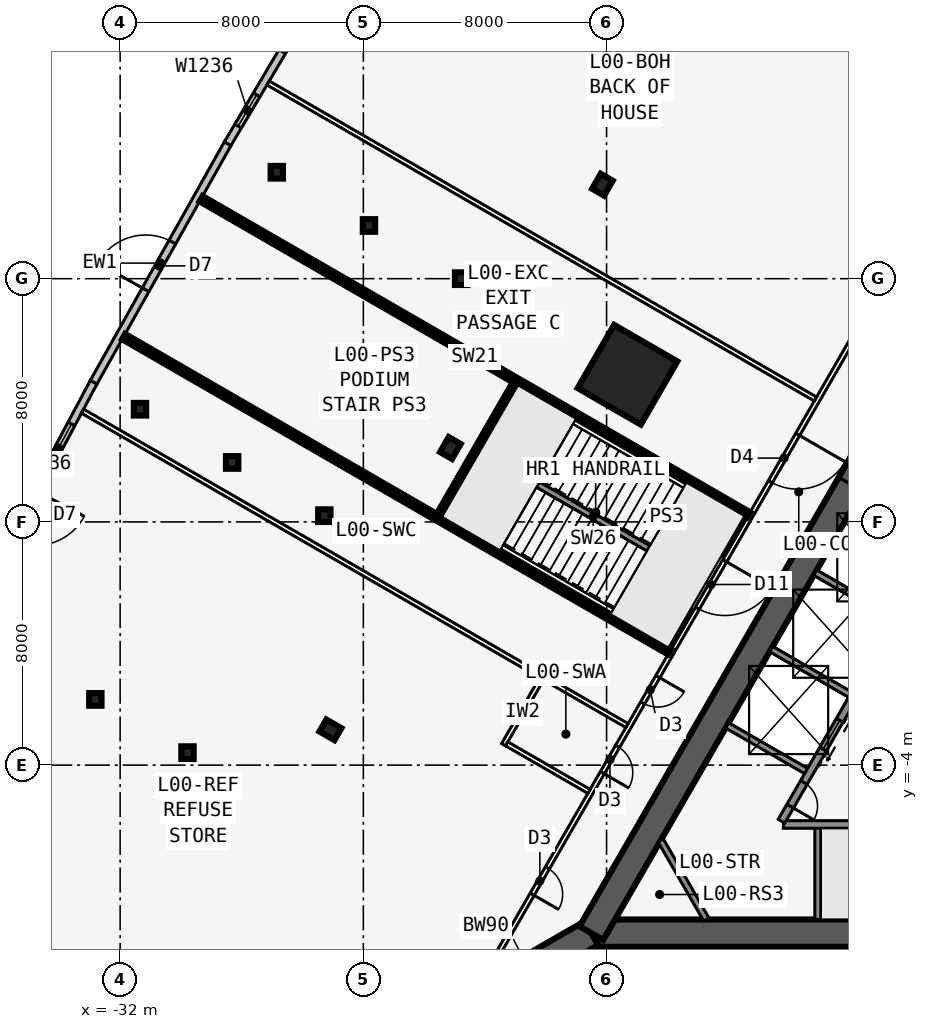
"""IFC4 building model, lengths in metres.
Left out: names, types, materials, properties, quantities, classifications, styles, units other than length and angle.
Written with IfcOpenShell. Run it as: python <this file> out.ifc"""

import sys

from ifc_helpers import new_model, si_unit, direction, frame, frame_2d, origin, origin_2d, place, context, subcontext, project, spatial, rectangle, i_section, extrude, element, fill, save


model = new_model("IFC4")
c1 = context("Model", 3, precision=1e-05, world=origin(), true_north=direction((0.0, 1.0)))
c2 = subcontext(c1, "Body", "Model", "MODEL_VIEW")
j1 = project(units=[si_unit("LENGTHUNIT", "METRE"), si_unit("PLANEANGLEUNIT", "RADIAN")], contexts=[c1])
p1 = place(None, origin())
s1 = spatial("IfcSite", under=j1, at=p1, CompositionType="ELEMENT")
p2 = place(p1, origin())
s2 = spatial("IfcBuilding", under=s1, at=p2, CompositionType="ELEMENT")
p3 = place(p2, origin())
s3 = spatial("IfcBuildingStorey", under=s2, at=p3, CompositionType="ELEMENT", Elevation=0.0)
p4 = place(p3, frame((-16.5, -9.526, -0.3), z_axis=(0.0, 0.0, 1.0), x_axis=(1.0, 0.0, 0.0)))
e1 = element("IfcWall", 1, at=p4, inside=s3, PredefinedType="SHEAR", context=c2, shape_type="SweptSolid", body=[
    extrude(rectangle(XDim=33.0, YDim=0.9, at=frame_2d((16.5, 0.0))), origin(), (0.0, 0.0, 1.0), 6.3),
])
p5 = place(p4, frame((14.05, 0.0, 0.3)))
e2 = element("IfcOpeningElement", 2, at=p5, cuts=e1, PredefinedType="OPENING", context=c2, shape_type="SweptSolid", body=[
    extrude(rectangle(XDim=1.8, YDim=2.13, at=frame_2d((0.9, 1.065))), frame((0.0, 0.46, 0.0), z_axis=(0.0, -1.0, 0.0), x_axis=(1.0, 0.0, 0.0)), (0.0, 0.0, 1.0), 0.92),
])
p6 = place(p3, frame((-10.183, -5.951, -0.3), z_axis=(0.0, 0.0, 1.0), x_axis=(1.0, 0.0, 0.0)))
e3 = element("IfcWall", 3, at=p6, inside=s3, PredefinedType="SOLIDWALL", context=c2, shape_type="SweptSolid", body=[
    extrude(rectangle(XDim=7.633, YDim=0.25, at=frame_2d((3.816, 0.0))), origin(), (0.0, 0.0, 1.0), 6.05),
])
p7 = place(p3, frame((-9.05, -5.951, -0.3), z_axis=(0.0, 0.0, 1.0), x_axis=(0.0, -1.0, 0.0)))
e4 = element("IfcWall", 4, at=p7, inside=s3, PredefinedType="SOLIDWALL", context=c2, shape_type="SweptSolid", body=[
    extrude(rectangle(XDim=3.125, YDim=0.2, at=frame_2d((1.562, 0.0))), origin(), (0.0, 0.0, 1.0), 6.05),
])
p8 = place(p3, frame((0.0, 19.052, -0.3), z_axis=(0.0, 0.0, 1.0), x_axis=(-0.499999749417, -0.866025548458, 0.0)))
e5 = element("IfcWall", 5, at=p8, inside=s3, PredefinedType="SHEAR", context=c2, shape_type="SweptSolid", body=[
    extrude(rectangle(XDim=33.0, YDim=0.9, at=frame_2d((16.5, 0.0))), origin(), (0.0, 0.0, 1.0), 6.3),
])
p9 = place(p8, frame((14.15, 0.0, 0.3)))
e6 = element("IfcOpeningElement", 6, at=p9, cuts=e5, PredefinedType="OPENING", context=c2, shape_type="SweptSolid", body=[
    extrude(rectangle(XDim=1.8, YDim=2.13, at=frame_2d((0.9, 1.065))), frame((0.0, 0.46, 0.0), z_axis=(0.0, -1.0, 0.0), x_axis=(1.0, 0.0, 0.0)), (0.0, 0.0, 1.0), 0.92),
])
p10 = place(p8, frame((12.6, 0.0, 0.3)))
e7 = element("IfcOpeningElement", 7, at=p10, cuts=e5, PredefinedType="OPENING", context=c2, shape_type="SweptSolid", body=[
    extrude(rectangle(XDim=1.0, YDim=2.13, at=frame_2d((0.5, 1.065))), frame((0.0, 0.46, 0.0), z_axis=(0.0, -1.0, 0.0), x_axis=(1.0, 0.0, 0.0)), (0.0, 0.0, 1.0), 0.92),
])
p11 = place(p3, frame((-4.929, 3.365, -0.3), z_axis=(0.0, 0.0, 1.0), x_axis=(-0.499991433582, -0.866030349552, 0.0)))
e8 = element("IfcWall", 8, at=p11, inside=s3, PredefinedType="SOLIDWALL", context=c2, shape_type="SweptSolid", body=[
    extrude(rectangle(XDim=10.633, YDim=0.25, at=frame_2d((5.316, 0.0))), origin(), (0.0, 0.0, 1.0), 6.05),
])
p12 = place(p11, frame((9.164, 0.0, 0.3)))
e9 = element("IfcOpeningElement", 9, at=p12, cuts=e8, PredefinedType="OPENING", context=c2, shape_type="SweptSolid", body=[
    extrude(rectangle(XDim=0.9, YDim=2.13, at=frame_2d((0.45, 1.065))), frame((0.0, 0.135, 0.0), z_axis=(0.0, -1.0, 0.0), x_axis=(1.0, 0.0, 0.0)), (0.0, 0.0, 1.0), 0.27),
])
p13 = place(p11, frame((6.8, 0.0, 0.3)))
e10 = element("IfcOpeningElement", 10, at=p13, cuts=e8, PredefinedType="OPENING", context=c2, shape_type="SweptSolid", body=[
    extrude(rectangle(XDim=1.1, YDim=2.13, at=frame_2d((0.55, 1.065))), frame((0.0, 0.135, 0.0), z_axis=(0.0, -1.0, 0.0), x_axis=(1.0, 0.0, 0.0)), (0.0, 0.0, 1.0), 0.27),
])
p14 = place(p11, frame((1.0, 0.0, 0.3)))
e11 = element("IfcOpeningElement", 11, at=p14, cuts=e8, PredefinedType="OPENING", context=c2, shape_type="SweptSolid", body=[
    extrude(rectangle(XDim=1.1, YDim=2.13, at=frame_2d((0.55, 1.065))), frame((0.0, 0.135, 0.0), z_axis=(0.0, -1.0, 0.0), x_axis=(1.0, 0.0, 0.0)), (0.0, 0.0, 1.0), 0.27),
])
p15 = place(p11, frame((3.9, 0.0, 0.3)))
e12 = element("IfcOpeningElement", 12, at=p15, cuts=e8, PredefinedType="OPENING", context=c2, shape_type="SweptSolid", body=[
    extrude(rectangle(XDim=1.1, YDim=2.13, at=frame_2d((0.55, 1.065))), frame((0.0, 0.135, 0.0), z_axis=(0.0, -1.0, 0.0), x_axis=(1.0, 0.0, 0.0)), (0.0, 0.0, 1.0), 0.27),
])
for number, where, z_axis, x_axis in (
    (13, (-6.429, 0.767, -0.3), (0.0, 0.0, 1.0), (-0.866, 0.5, 0.0)),
    (14, (-7.879, -1.744, -0.3), (0.0, 0.0, 1.0), (-0.866, 0.5, 0.0)),
    (15, (-9.329, -4.256, -0.3), (0.0, 0.0, 1.0), (-0.866, 0.5, 0.0)),
):
    element("IfcWall", number, at=place(p3, frame(where, z_axis=z_axis, x_axis=x_axis)), inside=s3, PredefinedType="SOLIDWALL", context=c2, shape_type="SweptSolid", body=[
        extrude(rectangle(XDim=3.125, YDim=0.2, at=frame_2d((1.562, 0.0))), origin(), (0.0, 0.0, 1.0), 6.05),
    ])
p16 = place(p3, frame((-16.5, -9.526, -0.3), z_axis=(0.0, 0.0, 1.0), x_axis=(-0.866031398331, -0.499989616998, 0.0)))
e16 = element("IfcWall", 16, at=p16, inside=s3, PredefinedType="SHEAR", context=c2, shape_type="SweptSolid", body=[
    extrude(rectangle(XDim=4.746, YDim=0.9, at=frame_2d((2.373, 0.0))), origin(), (0.0, 0.0, 1.0), 6.3),
])
p17 = place(p16, frame((1.8, 0.0, 0.3)))
e17 = element("IfcOpeningElement", 17, at=p17, cuts=e16, PredefinedType="OPENING", context=c2, shape_type="SweptSolid", body=[
    extrude(rectangle(XDim=1.8, YDim=2.13, at=frame_2d((0.9, 1.065))), frame((0.0, 0.46, 0.0), z_axis=(0.0, -1.0, 0.0), x_axis=(1.0, 0.0, 0.0)), (0.0, 0.0, 1.0), 0.92),
])
for number, where, z_axis, x_axis in (
    (18, (-16.137, 15.09, -0.3), (0.0, 0.0, 1.0), (-0.866, 0.5, 0.0)),
    (19, (-21.137, 6.43, -0.3), (0.0, 0.0, 1.0), (-0.866, 0.5, 0.0)),
    (20, (-25.083, -2.839, -0.3), (0.0, 0.0, 1.0), (-0.5, -0.866, 0.0)),
):
    element("IfcColumn", number, at=place(p3, frame(where, z_axis=z_axis, x_axis=x_axis)), inside=s3, PredefinedType="COLUMN", context=c2, shape_type="SweptSolid", body=[
        extrude(i_section(OverallWidth=0.455, OverallDepth=0.569, WebThickness=0.078, FlangeThickness=0.125, at=origin_2d()), origin(), (0.0, 0.0, 1.0), 6.3),
    ])
for number, where, z_axis, x_axis in (
    (21, (-20.785, 12.0, -0.3), (0.0, 0.0, 1.0), (1.0, 0.0, 0.0)),
    (22, (-29.785, -3.588, -0.3), (0.0, 0.0, 1.0), (1.0, 0.0, 0.0)),
    (23, (-25.285, 4.206, -0.3), (0.0, 0.0, 1.0), (1.0, 0.0, 0.0)),
    (24, (-23.816, 13.75, -0.3), (0.0, 0.0, 1.0), (1.0, 0.0, 0.0)),
    (25, (-32.816, -1.838, -0.3), (0.0, 0.0, 1.0), (1.0, 0.0, 0.0)),
    (26, (-28.316, 5.956, -0.3), (0.0, 0.0, 1.0), (1.0, 0.0, 0.0)),
    (27, (-26.847, 15.5, -0.3), (0.0, 0.0, 1.0), (1.0, 0.0, 0.0)),
    (28, (-31.347, 7.706, -0.3), (0.0, 0.0, 1.0), (1.0, 0.0, 0.0)),
):
    element("IfcColumn", number, at=place(p3, frame(where, z_axis=z_axis, x_axis=x_axis)), inside=s3, PredefinedType="COLUMN", context=c2, shape_type="SweptSolid", body=[
        extrude(i_section(OverallWidth=0.406, OverallDepth=0.417, WebThickness=0.03, FlangeThickness=0.048, at=origin_2d()), origin(), (0.0, 0.0, 1.0), 6.3),
    ])
p18 = place(p3, frame((-15.312, 8.84, -0.3), z_axis=(0.0, 0.0, 1.0), x_axis=(-0.866025403784, 0.5, 0.0)))
e29 = element("IfcColumn", 29, at=p18, inside=s3, PredefinedType="COLUMN", context=c2, shape_type="SweptSolid", body=[
    extrude(rectangle(XDim=2.4, YDim=2.4, at=origin_2d()), origin(), (0.0, 0.0, 1.0), 6.3),
])
p19 = place(p3, frame((-23.876, 24.175, -0.3), z_axis=(0.0, 0.0, 1.0), x_axis=(-0.510009078305, -0.860169018302, 0.0)))
e30 = element("IfcWall", 30, at=p19, inside=s3, PredefinedType="STANDARD", context=c2, shape_type="SweptSolid", body=[
    extrude(rectangle(XDim=9.0, YDim=0.25, at=frame_2d((4.5, 0.0))), origin(), (0.0, 0.0, 1.0), 6.05),
])
p20 = place(p19, frame((1.273, 0.0, 1.2)))
e31 = element("IfcOpeningElement", 31, at=p20, cuts=e30, PredefinedType="OPENING", context=c2, shape_type="SweptSolid", body=[
    extrude(rectangle(XDim=4.2, YDim=3.6, at=frame_2d((2.1, 1.8))), frame((0.0, 0.135, 0.0), z_axis=(0.0, -1.0, 0.0), x_axis=(1.0, 0.0, 0.0)), (0.0, 0.0, 1.0), 0.27),
])
p21 = place(p19, frame((7.123, 0.0, 1.2)))
e32 = element("IfcOpeningElement", 32, at=p21, cuts=e30, PredefinedType="OPENING", context=c2, shape_type="SweptSolid", body=[
    extrude(rectangle(XDim=1.2, YDim=3.6, at=frame_2d((0.6, 1.8))), frame((0.0, 0.135, 0.0), z_axis=(0.0, -1.0, 0.0), x_axis=(1.0, 0.0, 0.0)), (0.0, 0.0, 1.0), 0.27),
])
p22 = place(p3, frame((-32.875, 8.589, -0.3), z_axis=(0.0, 0.0, 1.0), x_axis=(0.489927657557, 0.871763093025, 0.0)))
e33 = element("IfcWall", 33, at=p22, inside=s3, PredefinedType="STANDARD", context=c2, shape_type="SweptSolid", body=[
    extrude(rectangle(XDim=9.001, YDim=0.25, at=frame_2d((4.5, 0.0))), origin(), (0.0, 0.0, 1.0), 6.05),
])
p23 = place(p22, frame((3.495, 0.0, 0.3)))
e34 = element("IfcOpeningElement", 34, at=p23, cuts=e33, PredefinedType="OPENING", context=c2, shape_type="SweptSolid", body=[
    extrude(rectangle(XDim=1.8, YDim=2.7, at=frame_2d((0.9, 1.35))), frame((0.0, 0.135, 0.0), z_axis=(0.0, -1.0, 0.0), x_axis=(1.0, 0.0, 0.0)), (0.0, 0.0, 1.0), 0.27),
])
p24 = place(p3, frame((-32.873, 8.592, -0.3), z_axis=(0.0, 0.0, 1.0), x_axis=(-0.469531141255, -0.882915911846, 0.0)))
e35 = element("IfcWall", 35, at=p24, inside=s3, PredefinedType="STANDARD", context=c2, shape_type="SweptSolid", body=[
    extrude(rectangle(XDim=9.005, YDim=0.25, at=frame_2d((4.503, 0.0))), origin(), (0.0, 0.0, 1.0), 6.05),
])
p25 = place(p24, frame((4.036, 0.0, 0.3)))
e36 = element("IfcOpeningElement", 36, at=p25, cuts=e35, PredefinedType="OPENING", context=c2, shape_type="SweptSolid", body=[
    extrude(rectangle(XDim=1.8, YDim=2.7, at=frame_2d((0.9, 1.35))), frame((0.0, 0.135, 0.0), z_axis=(0.0, -1.0, 0.0), x_axis=(1.0, 0.0, 0.0)), (0.0, 0.0, 1.0), 0.27),
])
p26 = place(p24, frame((1.551, 0.0, 1.2)))
e37 = element("IfcOpeningElement", 37, at=p26, cuts=e35, PredefinedType="OPENING", context=c2, shape_type="SweptSolid", body=[
    extrude(rectangle(XDim=1.8, YDim=3.6, at=frame_2d((0.9, 1.8))), frame((0.0, 0.135, 0.0), z_axis=(0.0, -1.0, 0.0), x_axis=(1.0, 0.0, 0.0)), (0.0, 0.0, 1.0), 0.27),
])
p27 = place(p24, frame((6.521, 0.0, 1.2)))
e38 = element("IfcOpeningElement", 38, at=p27, cuts=e35, PredefinedType="OPENING", context=c2, shape_type="SweptSolid", body=[
    extrude(rectangle(XDim=1.8, YDim=3.6, at=frame_2d((0.9, 1.8))), frame((0.0, 0.135, 0.0), z_axis=(0.0, -1.0, 0.0), x_axis=(1.0, 0.0, 0.0)), (0.0, 0.0, 1.0), 0.27),
])
p28 = place(p3, frame((-0.5, 22.836, -0.3), z_axis=(0.0, 0.0, 1.0), x_axis=(-0.500001677587, -0.866024435227, 0.0)))
e39 = element("IfcWall", 39, at=p28, inside=s3, PredefinedType="PARTITIONING", context=c2, shape_type="SweptSolid", body=[
    extrude(rectangle(XDim=39.054, YDim=0.15, at=frame_2d((19.527, 0.0))), origin(), (0.0, 0.0, 1.0), 5.108),
])
p29 = place(p28, frame((2.013, 0.0, 0.3)))
e40 = element("IfcOpeningElement", 40, at=p29, cuts=e39, PredefinedType="OPENING", context=c2, shape_type="SweptSolid", body=[
    extrude(rectangle(XDim=1.8, YDim=2.13, at=frame_2d((0.9, 1.065))), frame((0.0, 0.085, 0.0), z_axis=(0.0, -1.0, 0.0), x_axis=(1.0, 0.0, 0.0)), (0.0, 0.0, 1.0), 0.17),
])
p30 = place(p28, frame((10.427, 0.0, 0.3)))
e41 = element("IfcOpeningElement", 41, at=p30, cuts=e39, PredefinedType="OPENING", context=c2, shape_type="SweptSolid", body=[
    extrude(rectangle(XDim=1.8, YDim=2.13, at=frame_2d((0.9, 1.065))), frame((0.0, 0.085, 0.0), z_axis=(0.0, -1.0, 0.0), x_axis=(1.0, 0.0, 0.0)), (0.0, 0.0, 1.0), 0.17),
])
p31 = place(p28, frame((18.427, 0.0, 0.3)))
e42 = element("IfcOpeningElement", 42, at=p31, cuts=e39, PredefinedType="OPENING", context=c2, shape_type="SweptSolid", body=[
    extrude(rectangle(XDim=1.8, YDim=2.13, at=frame_2d((0.9, 1.065))), frame((0.0, 0.085, 0.0), z_axis=(0.0, -1.0, 0.0), x_axis=(1.0, 0.0, 0.0)), (0.0, 0.0, 1.0), 0.17),
])
p32 = place(p28, frame((23.227, 0.0, 0.3)))
e43 = element("IfcOpeningElement", 43, at=p32, cuts=e39, PredefinedType="OPENING", context=c2, shape_type="SweptSolid", body=[
    extrude(rectangle(XDim=1.8, YDim=2.13, at=frame_2d((0.9, 1.065))), frame((0.0, 0.085, 0.0), z_axis=(0.0, -1.0, 0.0), x_axis=(1.0, 0.0, 0.0)), (0.0, 0.0, 1.0), 0.17),
])
p33 = place(p28, frame((27.627, 0.0, 0.3)))
e44 = element("IfcOpeningElement", 44, at=p33, cuts=e39, PredefinedType="OPENING", context=c2, shape_type="SweptSolid", body=[
    extrude(rectangle(XDim=1.0, YDim=2.13, at=frame_2d((0.5, 1.065))), frame((0.0, 0.085, 0.0), z_axis=(0.0, -1.0, 0.0), x_axis=(1.0, 0.0, 0.0)), (0.0, 0.0, 1.0), 0.17),
])
p34 = place(p28, frame((30.277, 0.0, 0.3)))
e45 = element("IfcOpeningElement", 45, at=p34, cuts=e39, PredefinedType="OPENING", context=c2, shape_type="SweptSolid", body=[
    extrude(rectangle(XDim=1.0, YDim=2.13, at=frame_2d((0.5, 1.065))), frame((0.0, 0.085, 0.0), z_axis=(0.0, -1.0, 0.0), x_axis=(1.0, 0.0, 0.0)), (0.0, 0.0, 1.0), 0.17),
])
p35 = place(p28, frame((34.89, 0.0, 0.3)))
e46 = element("IfcOpeningElement", 46, at=p35, cuts=e39, PredefinedType="OPENING", context=c2, shape_type="SweptSolid", body=[
    extrude(rectangle(XDim=1.0, YDim=2.13, at=frame_2d((0.5, 1.065))), frame((0.0, 0.085, 0.0), z_axis=(0.0, -1.0, 0.0), x_axis=(1.0, 0.0, 0.0)), (0.0, 0.0, 1.0), 0.17),
])
p36 = place(p3, frame((-3.329, 18.087, -0.3), z_axis=(0.0, 0.0, 1.0), x_axis=(-0.866020300771, 0.500008838574, 0.0)))
e47 = element("IfcWall", 47, at=p36, inside=s3, PredefinedType="PARTITIONING", context=c2, shape_type="SweptSolid", body=[
    extrude(rectangle(XDim=20.539, YDim=0.15, at=frame_2d((10.27, 0.0))), origin(), (0.0, 0.0, 1.0), 6.05),
])
p37 = place(p3, frame((-9.128, 8.042, -0.3), z_axis=(0.0, 0.0, 1.0), x_axis=(-0.866022493458, 0.5000050408, 0.0)))
e48 = element("IfcWall", 48, at=p37, inside=s3, PredefinedType="PARTITIONING", context=c2, shape_type="SweptSolid", body=[
    extrude(rectangle(XDim=20.79, YDim=0.15, at=frame_2d((10.395, 0.0))), origin(), (0.0, 0.0, 1.0), 6.05),
])
p38 = place(p3, frame((-11.329, 4.231, -0.3), z_axis=(0.0, 0.0, 1.0), x_axis=(-0.866025850686, 0.499999225942, 0.0)))
e49 = element("IfcWall", 49, at=p38, inside=s3, PredefinedType="SHEAR", context=c2, shape_type="SweptSolid", body=[
    extrude(rectangle(XDim=20.794, YDim=0.2, at=frame_2d((10.397, 0.0))), origin(), (0.0, 0.0, 1.0), 6.3),
])
p39 = place(p3, frame((-13.928, -0.272, -0.3), z_axis=(0.0, 0.0, 1.0), x_axis=(-0.866025976348, 0.499999008289, 0.0)))
e50 = element("IfcWall", 50, at=p39, inside=s3, PredefinedType="SHEAR", context=c2, shape_type="SweptSolid", body=[
    extrude(rectangle(XDim=20.734, YDim=0.2, at=frame_2d((10.367, 0.0))), origin(), (0.0, 0.0, 1.0), 6.3),
])
p40 = place(p3, frame((-15.329, -2.697, -0.3), z_axis=(0.0, 0.0, 1.0), x_axis=(-0.866026526444, 0.499998055492, 0.0)))
e51 = element("IfcWall", 51, at=p40, inside=s3, PredefinedType="PARTITIONING", context=c2, shape_type="SweptSolid", body=[
    extrude(rectangle(XDim=20.678, YDim=0.15, at=frame_2d((10.339, 0.0))), origin(), (0.0, 0.0, 1.0), 5.108),
])
p41 = place(p3, frame((-18.137, -1.162, -0.3), z_axis=(0.0, 0.0, 1.0), x_axis=(-0.500004234368, -0.866022959057, 0.0)))
e52 = element("IfcWall", 52, at=p41, inside=s3, PredefinedType="PARTITIONING", context=c2, shape_type="SweptSolid", body=[
    extrude(rectangle(XDim=2.5, YDim=0.15, at=frame_2d((1.25, 0.0))), origin(), (0.0, 0.0, 1.0), 6.05),
])
p42 = place(p3, frame((-16.579, -4.862, -0.3), z_axis=(0.0, 0.0, 1.0), x_axis=(-0.866022959057, 0.500004234368, 0.0)))
e53 = element("IfcWall", 53, at=p42, inside=s3, PredefinedType="PARTITIONING", context=c2, shape_type="SweptSolid", body=[
    extrude(rectangle(XDim=3.125, YDim=0.15, at=frame_2d((1.562, 0.0))), origin(), (0.0, 0.0, 1.0), 6.05),
])
p43 = place(p3, frame((-12.719, -9.076, -0.3), z_axis=(0.0, 0.0, 1.0), x_axis=(-0.499952404951, 0.866052881055, 0.0)))
e54 = element("IfcWall", 54, at=p43, inside=s3, PredefinedType="SOLIDWALL", context=c2, shape_type="SweptSolid", body=[
    extrude(rectangle(XDim=3.002, YDim=0.2, at=frame_2d((1.501, 0.0))), origin(), (0.0, 0.0, 1.0), 6.05),
])
p44 = place(p3, frame((-18.949, 8.631, -0.3), z_axis=(0.0, 0.0, 1.0), x_axis=(-0.500006934395, -0.866021400173, 0.0)))
e55 = element("IfcWall", 55, at=p44, inside=s3, PredefinedType="SHEAR", context=c2, shape_type="SweptSolid", body=[
    extrude(rectangle(XDim=5.2, YDim=0.2, at=frame_2d((2.6, 0.0))), origin(), (0.0, 0.0, 1.0), 6.3),
])
for number, where, z_axis, x_axis in (
    (56, (-11.422, 4.169, -0.3), (0.0, 0.0, 1.0), (-0.5, -0.866, 0.0)),
    (57, (-13.172, 1.138, -0.3), (0.0, 0.0, 1.0), (-0.5, -0.866, 0.0)),
):
    element("IfcWall", number, at=place(p3, frame(where, z_axis=z_axis, x_axis=x_axis)), inside=s3, PredefinedType="SOLIDWALL", context=c2, shape_type="SweptSolid", body=[
        extrude(rectangle(XDim=1.5, YDim=0.1, at=frame_2d((0.75, 0.0))), origin(), (0.0, 0.0, 1.0), 6.3),
    ])
p45 = place(p3, frame((-14.623, 3.131, 0.0), z_axis=(0.0, 0.0, 1.0), x_axis=(-0.866031452229, 0.49998952364, 0.0)))
e58 = element("IfcWall", 58, at=p45, inside=s3, PredefinedType="SOLIDWALL", context=c2, shape_type="SweptSolid", body=[
    extrude(rectangle(XDim=4.194, YDim=0.2, at=frame_2d((2.097, 0.0))), origin(), (0.0, 0.0, 1.0), 6.0),
])
p46 = place(p21, origin())
e59 = element("IfcWindow", 59, at=p46, inside=s3, PartitioningType="SINGLE_PANEL", PredefinedType="WINDOW", context=c2, shape_type="SweptSolid", body=[
    extrude(rectangle(XDim=1.2, YDim=3.6, at=frame_2d((0.6, 1.8))), frame((0.0, 0.03, 0.0), z_axis=(0.0, -1.0, 0.0), x_axis=(1.0, 0.0, 0.0)), (0.0, 0.0, 1.0), 0.06),
])
fill(e32, e59)
p47 = place(p23, origin())
e60 = element("IfcDoor", 60, at=p47, inside=s3, OperationType="DOUBLE_DOOR_SINGLE_SWING", PredefinedType="DOOR", context=c2, shape_type="SweptSolid", body=[
    extrude(rectangle(XDim=1.8, YDim=2.7, at=frame_2d((0.9, 1.35))), frame((0.0, 0.025, 0.0), z_axis=(0.0, -1.0, 0.0), x_axis=(1.0, 0.0, 0.0)), (0.0, 0.0, 1.0), 0.05),
])
fill(e34, e60)
p48 = place(p26, origin())
e61 = element("IfcWindow", 61, at=p48, inside=s3, PartitioningType="SINGLE_PANEL", PredefinedType="WINDOW", context=c2, shape_type="SweptSolid", body=[
    extrude(rectangle(XDim=1.8, YDim=3.6, at=frame_2d((0.9, 1.8))), frame((0.0, 0.03, 0.0), z_axis=(0.0, -1.0, 0.0), x_axis=(1.0, 0.0, 0.0)), (0.0, 0.0, 1.0), 0.06),
])
fill(e37, e61)
p49 = place(p31, origin())
e62 = element("IfcDoor", 62, at=p49, inside=s3, OperationType="DOUBLE_DOOR_SINGLE_SWING", PredefinedType="DOOR", context=c2, shape_type="SweptSolid", body=[
    extrude(rectangle(XDim=1.8, YDim=2.13, at=frame_2d((0.9, 1.065))), frame((0.0, 0.025, 0.0), z_axis=(0.0, -1.0, 0.0), x_axis=(1.0, 0.0, 0.0)), (0.0, 0.0, 1.0), 0.05),
])
fill(e42, e62)
p50 = place(p32, origin())
e63 = element("IfcDoor", 63, at=p50, inside=s3, OperationType="DOUBLE_DOOR_SINGLE_SWING", PredefinedType="DOOR", context=c2, shape_type="SweptSolid", body=[
    extrude(rectangle(XDim=1.8, YDim=2.13, at=frame_2d((0.9, 1.065))), frame((0.0, 0.025, 0.0), z_axis=(0.0, -1.0, 0.0), x_axis=(1.0, 0.0, 0.0)), (0.0, 0.0, 1.0), 0.05),
])
fill(e43, e63)
p51 = place(p33, origin())
e64 = element("IfcDoor", 64, at=p51, inside=s3, OperationType="SINGLE_SWING_LEFT", PredefinedType="DOOR", context=c2, shape_type="SweptSolid", body=[
    extrude(rectangle(XDim=1.0, YDim=2.13, at=frame_2d((0.5, 1.065))), frame((0.0, 0.025, 0.0), z_axis=(0.0, -1.0, 0.0), x_axis=(1.0, 0.0, 0.0)), (0.0, 0.0, 1.0), 0.05),
])
fill(e44, e64)
p52 = place(p34, origin())
e65 = element("IfcDoor", 65, at=p52, inside=s3, OperationType="SINGLE_SWING_RIGHT", PredefinedType="DOOR", context=c2, shape_type="SweptSolid", body=[
    extrude(rectangle(XDim=1.0, YDim=2.13, at=frame_2d((0.5, 1.065))), frame((0.0, 0.025, 0.0), z_axis=(0.0, -1.0, 0.0), x_axis=(1.0, 0.0, 0.0)), (0.0, 0.0, 1.0), 0.05),
])
fill(e45, e65)
p53 = place(p35, origin())
e66 = element("IfcDoor", 66, at=p53, inside=s3, OperationType="SINGLE_SWING_RIGHT", PredefinedType="DOOR", context=c2, shape_type="SweptSolid", body=[
    extrude(rectangle(XDim=1.0, YDim=2.13, at=frame_2d((0.5, 1.065))), frame((0.0, 0.025, 0.0), z_axis=(0.0, -1.0, 0.0), x_axis=(1.0, 0.0, 0.0)), (0.0, 0.0, 1.0), 0.05),
])
fill(e46, e66)
p54 = place(p12, origin())
e67 = element("IfcDoor", 67, at=p54, inside=s3, OperationType="SINGLE_SWING_RIGHT", PredefinedType="DOOR", context=c2, shape_type="SweptSolid", body=[
    extrude(rectangle(XDim=0.9, YDim=2.13, at=frame_2d((0.45, 1.065))), frame((0.0, 0.025, 0.0), z_axis=(0.0, -1.0, 0.0), x_axis=(1.0, 0.0, 0.0)), (0.0, 0.0, 1.0), 0.05),
])
fill(e9, e67)
p55 = place(p13, origin())
e68 = element("IfcDoor", 68, at=p55, inside=s3, OperationType="DOUBLE_DOOR_SLIDING", PredefinedType="USERDEFINED", context=c2, shape_type="SweptSolid", body=[
    extrude(rectangle(XDim=1.1, YDim=2.13, at=frame_2d((0.55, 1.065))), frame((0.0, 0.025, 0.0), z_axis=(0.0, -1.0, 0.0), x_axis=(1.0, 0.0, 0.0)), (0.0, 0.0, 1.0), 0.05),
])
fill(e10, e68)
save(model, sys.argv[1])
